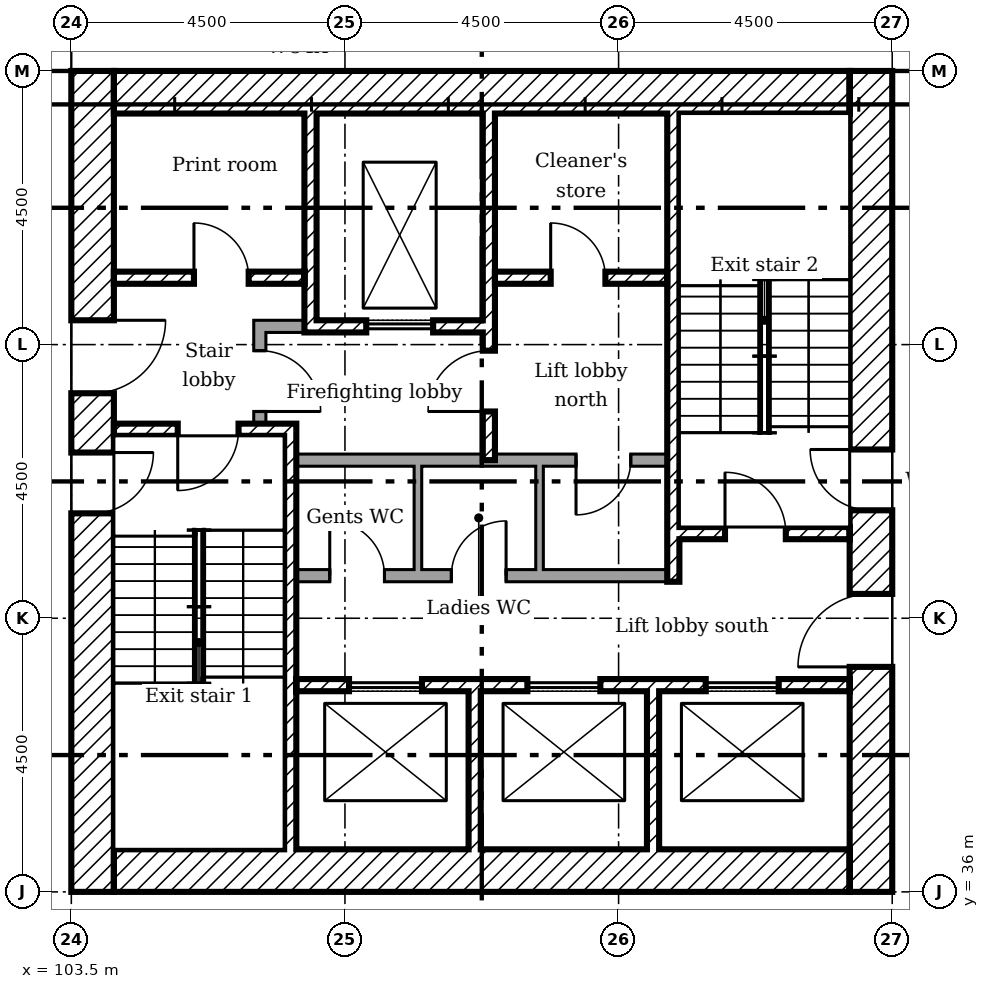
"""IFC4 building model, lengths in metres.
Left out: names, types, materials, properties, quantities, classifications, styles, units other than length and angle.
Written with IfcOpenShell. Run it as: python <this file> out.ifc"""

import sys

from ifc_helpers import new_model, si_unit, direction, frame, frame_2d, origin, place, context, subcontext, project, spatial, rectangle, extrude, element, fill, save


model = new_model("IFC4")
c1 = context("Model", 3, precision=1e-05, world=origin(), true_north=direction((0.0, 1.0)))
c2 = subcontext(c1, "Body", "Model", "MODEL_VIEW")
j1 = project(units=[si_unit("LENGTHUNIT", "METRE"), si_unit("PLANEANGLEUNIT", "RADIAN")], contexts=[c1])
p1 = place(None, origin())
s1 = spatial("IfcSite", under=j1, at=p1, CompositionType="ELEMENT")
p2 = place(p1, origin())
s2 = spatial("IfcBuilding", under=s1, at=p2, CompositionType="ELEMENT")
p3 = place(p2, frame((0.0, 0.0, 113.6)))
s3 = spatial("IfcBuildingStorey", under=s2, at=p3, CompositionType="ELEMENT", Elevation=113.6)
p4 = place(p3, frame((116.65, 36.0, 0.0), z_axis=(0.0, 0.0, 1.0), x_axis=(0.0, 1.0, 0.0)))
e1 = element("IfcWall", 1, at=p4, inside=s3, PredefinedType="SHEAR", context=c2, shape_type="SweptSolid", body=[
    extrude(rectangle(XDim=13.5, YDim=0.7, at=frame_2d((6.75, 0.0))), origin(), (0.0, 0.0, 1.0), 6.95),
])
p5 = place(p4, frame((3.7, 0.0, 0.0)))
e2 = element("IfcOpeningElement", 2, at=p5, cuts=e1, PredefinedType="OPENING", context=c2, shape_type="SweptSolid", body=[
    extrude(rectangle(XDim=1.2, YDim=2.1, at=frame_2d((0.6, 1.05))), frame((0.0, 0.36, 0.0), z_axis=(0.0, -1.0, 0.0), x_axis=(1.0, 0.0, 0.0)), (0.0, 0.0, 1.0), 0.72),
])
p6 = place(p4, frame((6.275, 0.0, 0.0)))
e3 = element("IfcOpeningElement", 3, at=p6, cuts=e1, PredefinedType="OPENING", context=c2, shape_type="SweptSolid", body=[
    extrude(rectangle(XDim=1.0, YDim=2.1, at=frame_2d((0.5, 1.05))), frame((0.0, 0.36, 0.0), z_axis=(0.0, -1.0, 0.0), x_axis=(1.0, 0.0, 0.0)), (0.0, 0.0, 1.0), 0.72),
])
for number, where in (
    (4, (104.2, 49.15, 0.0)),
    (5, (104.2, 36.35, 0.0)),
):
    element("IfcWall", number, at=place(p3, frame(where)), inside=s3, PredefinedType="SHEAR", context=c2, shape_type="SweptSolid", body=[
        extrude(rectangle(XDim=12.1, YDim=0.7, at=frame_2d((6.05, 0.0))), origin(), (0.0, 0.0, 1.0), 6.95),
    ])
p7 = place(p3, frame((103.85, 36.0, 0.0), z_axis=(0.0, 0.0, 1.0), x_axis=(0.0, 1.0, 0.0)))
e6 = element("IfcWall", 6, at=p7, inside=s3, PredefinedType="SHEAR", context=c2, shape_type="SweptSolid", body=[
    extrude(rectangle(XDim=13.5, YDim=0.7, at=frame_2d((6.75, 0.0))), origin(), (0.0, 0.0, 1.0), 6.95),
])
p8 = place(p7, frame((8.2, 0.0, 0.0)))
e7 = element("IfcOpeningElement", 7, at=p8, cuts=e6, PredefinedType="OPENING", context=c2, shape_type="SweptSolid", body=[
    extrude(rectangle(XDim=1.2, YDim=2.1, at=frame_2d((0.6, 1.05))), frame((0.0, 0.36, 0.0), z_axis=(0.0, -1.0, 0.0), x_axis=(1.0, 0.0, 0.0)), (0.0, 0.0, 1.0), 0.72),
])
p9 = place(p7, frame((6.225, 0.0, 0.0)))
e8 = element("IfcOpeningElement", 8, at=p9, cuts=e6, PredefinedType="OPENING", context=c2, shape_type="SweptSolid", body=[
    extrude(rectangle(XDim=1.0, YDim=2.1, at=frame_2d((0.5, 1.05))), frame((0.0, 0.36, 0.0), z_axis=(0.0, -1.0, 0.0), x_axis=(1.0, 0.0, 0.0)), (0.0, 0.0, 1.0), 0.72),
])
p10 = place(p3, frame((107.433, 48.8, 0.0), z_axis=(0.0, 0.0, 1.0), x_axis=(0.0, -1.0, 0.0)))
e9 = element("IfcWall", 9, at=p10, inside=s3, PredefinedType="SHEAR", context=c2, shape_type="SweptSolid", body=[
    extrude(rectangle(XDim=3.6, YDim=0.2, at=frame_2d((1.8, 0.0))), origin(), (0.0, 0.0, 1.0), 6.95),
])
p11 = place(p3, frame((110.367, 48.8, 0.0), z_axis=(0.0, 0.0, 1.0), x_axis=(0.0, -1.0, 0.0)))
e10 = element("IfcWall", 10, at=p11, inside=s3, PredefinedType="SHEAR", context=c2, shape_type="SweptSolid", body=[
    extrude(rectangle(XDim=5.7, YDim=0.2, at=frame_2d((2.85, 0.0))), origin(), (0.0, 0.0, 1.0), 6.95),
])
p12 = place(p11, frame((3.9, 0.0, 0.0)))
e11 = element("IfcOpeningElement", 11, at=p12, cuts=e10, PredefinedType="OPENING", context=c2, shape_type="SweptSolid", body=[
    extrude(rectangle(XDim=1.0, YDim=2.1, at=frame_2d((0.5, 1.05))), frame((0.0, 0.11, 0.0), z_axis=(0.0, -1.0, 0.0), x_axis=(1.0, 0.0, 0.0)), (0.0, 0.0, 1.0), 0.22),
])
for number, where, z_axis, x_axis in (
    (12, (110.133, 36.7, 0.0), (0.0, 0.0, 1.0), (0.0, 1.0, 0.0)),
    (13, (113.067, 36.7, 0.0), (0.0, 0.0, 1.0), (0.0, 1.0, 0.0)),
):
    element("IfcWall", number, at=place(p3, frame(where, z_axis=z_axis, x_axis=x_axis)), inside=s3, PredefinedType="SHEAR", context=c2, shape_type="SweptSolid", body=[
        extrude(rectangle(XDim=2.6, YDim=0.2, at=frame_2d((1.3, 0.0))), origin(), (0.0, 0.0, 1.0), 6.95),
    ])
p13 = place(p3, frame((106.5, 45.3, 0.0)))
e14 = element("IfcWall", 14, at=p13, inside=s3, PredefinedType="PARTITIONING", context=c2, shape_type="SweptSolid", body=[
    extrude(rectangle(XDim=0.833, YDim=0.2, at=frame_2d((0.417, 0.0))), origin(), (0.0, 0.0, 1.0), 6.95),
])
p14 = place(p3, frame((106.6, 43.7, 0.0), z_axis=(0.0, 0.0, 1.0), x_axis=(0.0, 1.0, 0.0)))
e15 = element("IfcWall", 15, at=p14, inside=s3, PredefinedType="PARTITIONING", context=c2, shape_type="SweptSolid", body=[
    extrude(rectangle(XDim=1.5, YDim=0.2, at=frame_2d((0.75, 0.0))), origin(), (0.0, 0.0, 1.0), 6.95),
])
p15 = place(p14, frame((0.2, 0.0, 0.0)))
e16 = element("IfcOpeningElement", 16, at=p15, cuts=e15, PredefinedType="OPENING", context=c2, shape_type="SweptSolid", body=[
    extrude(rectangle(XDim=1.0, YDim=2.1, at=frame_2d((0.5, 1.05))), frame((0.0, 0.11, 0.0), z_axis=(0.0, -1.0, 0.0), x_axis=(1.0, 0.0, 0.0)), (0.0, 0.0, 1.0), 0.22),
])
p16 = place(p3, frame((104.2, 46.1, 0.0)))
e17 = element("IfcWall", 17, at=p16, inside=s3, PredefinedType="SHEAR", context=c2, shape_type="SweptSolid", body=[
    extrude(rectangle(XDim=3.133, YDim=0.2, at=frame_2d((1.567, 0.0))), origin(), (0.0, 0.0, 1.0), 6.95),
])
p17 = place(p16, frame((1.317, 0.0, 0.0)))
e18 = element("IfcOpeningElement", 18, at=p17, cuts=e17, PredefinedType="OPENING", context=c2, shape_type="SweptSolid", body=[
    extrude(rectangle(XDim=0.9, YDim=2.1, at=frame_2d((0.45, 1.05))), frame((0.0, 0.11, 0.0), z_axis=(0.0, -1.0, 0.0), x_axis=(1.0, 0.0, 0.0)), (0.0, 0.0, 1.0), 0.22),
])
p18 = place(p3, frame((110.467, 46.1, 0.0)))
e19 = element("IfcWall", 19, at=p18, inside=s3, PredefinedType="SHEAR", context=c2, shape_type="SweptSolid", body=[
    extrude(rectangle(XDim=2.833, YDim=0.2, at=frame_2d((1.417, 0.0))), origin(), (0.0, 0.0, 1.0), 6.95),
])
p19 = place(p18, frame((0.917, 0.0, 0.0)))
e20 = element("IfcOpeningElement", 20, at=p19, cuts=e19, PredefinedType="OPENING", context=c2, shape_type="SweptSolid", body=[
    extrude(rectangle(XDim=0.9, YDim=2.1, at=frame_2d((0.45, 1.05))), frame((0.0, 0.11, 0.0), z_axis=(0.0, -1.0, 0.0), x_axis=(1.0, 0.0, 0.0)), (0.0, 0.0, 1.0), 0.22),
])
p20 = place(p3, frame((107.533, 45.3, 0.0)))
e21 = element("IfcWall", 21, at=p20, inside=s3, PredefinedType="SHEAR", context=c2, shape_type="SweptSolid", body=[
    extrude(rectangle(XDim=2.733, YDim=0.2, at=frame_2d((1.367, 0.0))), origin(), (0.0, 0.0, 1.0), 6.95),
])
p21 = place(p20, frame((0.817, 0.0, 0.0)))
e22 = element("IfcOpeningElement", 22, at=p21, cuts=e21, PredefinedType="OPENING", context=c2, shape_type="SweptSolid", body=[
    extrude(rectangle(XDim=1.1, YDim=2.1, at=frame_2d((0.55, 1.05))), frame((0.0, 0.11, 0.0), z_axis=(0.0, -1.0, 0.0), x_axis=(1.0, 0.0, 0.0)), (0.0, 0.0, 1.0), 0.22),
])
p22 = place(p3, frame((107.2, 39.4, 0.0)))
e23 = element("IfcWall", 23, at=p22, inside=s3, PredefinedType="SHEAR", context=c2, shape_type="SweptSolid", body=[
    extrude(rectangle(XDim=9.1, YDim=0.2, at=frame_2d((4.55, 0.0))), origin(), (0.0, 0.0, 1.0), 6.95),
])
p23 = place(p22, frame((0.867, 0.0, 0.0)))
e24 = element("IfcOpeningElement", 24, at=p23, cuts=e23, PredefinedType="OPENING", context=c2, shape_type="SweptSolid", body=[
    extrude(rectangle(XDim=1.2, YDim=2.1, at=frame_2d((0.6, 1.05))), frame((0.0, 0.11, 0.0), z_axis=(0.0, -1.0, 0.0), x_axis=(1.0, 0.0, 0.0)), (0.0, 0.0, 1.0), 0.22),
])
p24 = place(p22, frame((3.8, 0.0, 0.0)))
e25 = element("IfcOpeningElement", 25, at=p24, cuts=e23, PredefinedType="OPENING", context=c2, shape_type="SweptSolid", body=[
    extrude(rectangle(XDim=1.2, YDim=2.1, at=frame_2d((0.6, 1.05))), frame((0.0, 0.11, 0.0), z_axis=(0.0, -1.0, 0.0), x_axis=(1.0, 0.0, 0.0)), (0.0, 0.0, 1.0), 0.22),
])
p25 = place(p22, frame((6.733, 0.0, 0.0)))
e26 = element("IfcOpeningElement", 26, at=p25, cuts=e23, PredefinedType="OPENING", context=c2, shape_type="SweptSolid", body=[
    extrude(rectangle(XDim=1.2, YDim=2.1, at=frame_2d((0.6, 1.05))), frame((0.0, 0.11, 0.0), z_axis=(0.0, -1.0, 0.0), x_axis=(1.0, 0.0, 0.0)), (0.0, 0.0, 1.0), 0.22),
])
p26 = place(p3, frame((107.1, 36.7, 0.0), z_axis=(0.0, 0.0, 1.0), x_axis=(0.0, 1.0, 0.0)))
e27 = element("IfcWall", 27, at=p26, inside=s3, PredefinedType="SHEAR", context=c2, shape_type="SweptSolid", body=[
    extrude(rectangle(XDim=7.0, YDim=0.2, at=frame_2d((3.5, 0.0))), origin(), (0.0, 0.0, 1.0), 6.95),
])
p27 = place(p3, frame((104.2, 43.6, 0.0)))
e28 = element("IfcWall", 28, at=p27, inside=s3, PredefinedType="SHEAR", context=c2, shape_type="SweptSolid", body=[
    extrude(rectangle(XDim=2.8, YDim=0.2, at=frame_2d((1.4, 0.0))), origin(), (0.0, 0.0, 1.0), 6.95),
])
p28 = place(p27, frame((1.05, 0.0, 0.0)))
e29 = element("IfcOpeningElement", 29, at=p28, cuts=e28, PredefinedType="OPENING", context=c2, shape_type="SweptSolid", body=[
    extrude(rectangle(XDim=1.0, YDim=2.1, at=frame_2d((0.5, 1.05))), frame((0.0, 0.11, 0.0), z_axis=(0.0, -1.0, 0.0), x_axis=(1.0, 0.0, 0.0)), (0.0, 0.0, 1.0), 0.22),
])
p29 = place(p3, frame((113.5, 41.9, 0.0)))
e30 = element("IfcWall", 30, at=p29, inside=s3, PredefinedType="SHEAR", context=c2, shape_type="SweptSolid", body=[
    extrude(rectangle(XDim=2.8, YDim=0.2, at=frame_2d((1.4, 0.0))), origin(), (0.0, 0.0, 1.0), 6.95),
])
p30 = place(p29, frame((0.75, 0.0, 0.0)))
e31 = element("IfcOpeningElement", 31, at=p30, cuts=e30, PredefinedType="OPENING", context=c2, shape_type="SweptSolid", body=[
    extrude(rectangle(XDim=1.0, YDim=2.1, at=frame_2d((0.5, 1.05))), frame((0.0, 0.11, 0.0), z_axis=(0.0, -1.0, 0.0), x_axis=(1.0, 0.0, 0.0)), (0.0, 0.0, 1.0), 0.22),
])
p31 = place(p3, frame((113.4, 41.1, 0.0), z_axis=(0.0, 0.0, 1.0), x_axis=(0.0, 1.0, 0.0)))
e32 = element("IfcWall", 32, at=p31, inside=s3, PredefinedType="SHEAR", context=c2, shape_type="SweptSolid", body=[
    extrude(rectangle(XDim=7.7, YDim=0.2, at=frame_2d((3.85, 0.0))), origin(), (0.0, 0.0, 1.0), 6.95),
])
p32 = place(p3, frame((107.2, 43.1, 0.0)))
e33 = element("IfcWall", 33, at=p32, inside=s3, PredefinedType="PARTITIONING", context=c2, shape_type="SweptSolid", body=[
    extrude(rectangle(XDim=6.1, YDim=0.2, at=frame_2d((3.05, 0.0))), origin(), (0.0, 0.0, 1.0), 6.95),
])
p33 = place(p32, frame((4.6, 0.0, 0.0)))
e34 = element("IfcOpeningElement", 34, at=p33, cuts=e33, PredefinedType="OPENING", context=c2, shape_type="SweptSolid", body=[
    extrude(rectangle(XDim=0.9, YDim=2.1, at=frame_2d((0.45, 1.05))), frame((0.0, 0.11, 0.0), z_axis=(0.0, -1.0, 0.0), x_axis=(1.0, 0.0, 0.0)), (0.0, 0.0, 1.0), 0.22),
])
p34 = place(p3, frame((107.2, 41.2, 0.0)))
e35 = element("IfcWall", 35, at=p34, inside=s3, PredefinedType="PARTITIONING", context=c2, shape_type="SweptSolid", body=[
    extrude(rectangle(XDim=6.1, YDim=0.2, at=frame_2d((3.05, 0.0))), origin(), (0.0, 0.0, 1.0), 6.95),
])
p35 = place(p34, frame((0.55, 0.0, 0.0)))
e36 = element("IfcOpeningElement", 36, at=p35, cuts=e35, PredefinedType="OPENING", context=c2, shape_type="SweptSolid", body=[
    extrude(rectangle(XDim=0.9, YDim=2.1, at=frame_2d((0.45, 1.05))), frame((0.0, 0.11, 0.0), z_axis=(0.0, -1.0, 0.0), x_axis=(1.0, 0.0, 0.0)), (0.0, 0.0, 1.0), 0.22),
])
p36 = place(p34, frame((2.55, 0.0, 0.0)))
e37 = element("IfcOpeningElement", 37, at=p36, cuts=e35, PredefinedType="OPENING", context=c2, shape_type="SweptSolid", body=[
    extrude(rectangle(XDim=0.9, YDim=2.1, at=frame_2d((0.45, 1.05))), frame((0.0, 0.11, 0.0), z_axis=(0.0, -1.0, 0.0), x_axis=(1.0, 0.0, 0.0)), (0.0, 0.0, 1.0), 0.22),
])
for number, where, z_axis, x_axis in (
    (38, (109.2, 41.3, 0.0), (0.0, 0.0, 1.0), (0.0, 1.0, 0.0)),
    (39, (111.2, 41.3, 0.0), (0.0, 0.0, 1.0), (0.0, 1.0, 0.0)),
):
    element("IfcWall", number, at=place(p3, frame(where, z_axis=z_axis, x_axis=x_axis)), inside=s3, PredefinedType="PARTITIONING", context=c2, shape_type="SweptSolid", body=[
        extrude(rectangle(XDim=1.7, YDim=0.125, at=frame_2d((0.85, 0.0))), origin(), (0.0, 0.0, 1.0), 6.95),
    ])
p37 = place(p8, frame((1.2, 0.0, 0.0), x_axis=(-1.0, 0.0, 0.0)))
e40 = element("IfcDoor", 40, at=p37, inside=s3, OperationType="SINGLE_SWING_RIGHT", PredefinedType="DOOR", context=c2, shape_type="SweptSolid", body=[
    extrude(rectangle(XDim=1.2, YDim=2.1, at=frame_2d((0.6, 1.05))), frame((0.0, 0.025, 0.0), z_axis=(0.0, -1.0, 0.0), x_axis=(1.0, 0.0, 0.0)), (0.0, 0.0, 1.0), 0.05),
])
fill(e7, e40)
p38 = place(p5, origin())
e41 = element("IfcDoor", 41, at=p38, inside=s3, OperationType="SINGLE_SWING_RIGHT", PredefinedType="DOOR", context=c2, shape_type="SweptSolid", body=[
    extrude(rectangle(XDim=1.2, YDim=2.1, at=frame_2d((0.6, 1.05))), frame((0.0, 0.025, 0.0), z_axis=(0.0, -1.0, 0.0), x_axis=(1.0, 0.0, 0.0)), (0.0, 0.0, 1.0), 0.05),
])
fill(e2, e41)
p39 = place(p28, frame((1.0, 0.0, 0.0), x_axis=(-1.0, 0.0, 0.0)))
e42 = element("IfcDoor", 42, at=p39, inside=s3, OperationType="SINGLE_SWING_LEFT", PredefinedType="DOOR", context=c2, shape_type="SweptSolid", body=[
    extrude(rectangle(XDim=1.0, YDim=2.1, at=frame_2d((0.5, 1.05))), frame((0.0, 0.025, 0.0), z_axis=(0.0, -1.0, 0.0), x_axis=(1.0, 0.0, 0.0)), (0.0, 0.0, 1.0), 0.05),
])
fill(e29, e42)
p40 = place(p9, frame((1.0, 0.0, 0.0), x_axis=(-1.0, 0.0, 0.0)))
e43 = element("IfcDoor", 43, at=p40, inside=s3, OperationType="SINGLE_SWING_RIGHT", PredefinedType="DOOR", context=c2, shape_type="SweptSolid", body=[
    extrude(rectangle(XDim=1.0, YDim=2.1, at=frame_2d((0.5, 1.05))), frame((0.0, 0.025, 0.0), z_axis=(0.0, -1.0, 0.0), x_axis=(1.0, 0.0, 0.0)), (0.0, 0.0, 1.0), 0.05),
])
fill(e8, e43)
p41 = place(p30, origin())
e44 = element("IfcDoor", 44, at=p41, inside=s3, OperationType="SINGLE_SWING_RIGHT", PredefinedType="DOOR", context=c2, shape_type="SweptSolid", body=[
    extrude(rectangle(XDim=1.0, YDim=2.1, at=frame_2d((0.5, 1.05))), frame((0.0, 0.025, 0.0), z_axis=(0.0, -1.0, 0.0), x_axis=(1.0, 0.0, 0.0)), (0.0, 0.0, 1.0), 0.05),
])
fill(e31, e44)
p42 = place(p6, origin())
e45 = element("IfcDoor", 45, at=p42, inside=s3, OperationType="SINGLE_SWING_LEFT", PredefinedType="DOOR", context=c2, shape_type="SweptSolid", body=[
    extrude(rectangle(XDim=1.0, YDim=2.1, at=frame_2d((0.5, 1.05))), frame((0.0, 0.025, 0.0), z_axis=(0.0, -1.0, 0.0), x_axis=(1.0, 0.0, 0.0)), (0.0, 0.0, 1.0), 0.05),
])
fill(e3, e45)
p43 = place(p12, frame((1.0, 0.0, 0.0), x_axis=(-1.0, 0.0, 0.0)))
e46 = element("IfcDoor", 46, at=p43, inside=s3, OperationType="SINGLE_SWING_RIGHT", PredefinedType="DOOR", context=c2, shape_type="SweptSolid", body=[
    extrude(rectangle(XDim=1.0, YDim=2.1, at=frame_2d((0.5, 1.05))), frame((0.0, 0.025, 0.0), z_axis=(0.0, -1.0, 0.0), x_axis=(1.0, 0.0, 0.0)), (0.0, 0.0, 1.0), 0.05),
])
fill(e11, e46)
p44 = place(p15, frame((1.0, 0.0, 0.0), x_axis=(-1.0, 0.0, 0.0)))
e47 = element("IfcDoor", 47, at=p44, inside=s3, OperationType="SINGLE_SWING_LEFT", PredefinedType="DOOR", context=c2, shape_type="SweptSolid", body=[
    extrude(rectangle(XDim=1.0, YDim=2.1, at=frame_2d((0.5, 1.05))), frame((0.0, 0.025, 0.0), z_axis=(0.0, -1.0, 0.0), x_axis=(1.0, 0.0, 0.0)), (0.0, 0.0, 1.0), 0.05),
])
fill(e16, e47)
p45 = place(p17, origin())
e48 = element("IfcDoor", 48, at=p45, inside=s3, OperationType="SINGLE_SWING_RIGHT", PredefinedType="DOOR", context=c2, shape_type="SweptSolid", body=[
    extrude(rectangle(XDim=0.9, YDim=2.1, at=frame_2d((0.45, 1.05))), frame((0.0, 0.025, 0.0), z_axis=(0.0, -1.0, 0.0), x_axis=(1.0, 0.0, 0.0)), (0.0, 0.0, 1.0), 0.05),
])
fill(e18, e48)
p46 = place(p19, origin())
e49 = element("IfcDoor", 49, at=p46, inside=s3, OperationType="SINGLE_SWING_RIGHT", PredefinedType="DOOR", context=c2, shape_type="SweptSolid", body=[
    extrude(rectangle(XDim=0.9, YDim=2.1, at=frame_2d((0.45, 1.05))), frame((0.0, 0.025, 0.0), z_axis=(0.0, -1.0, 0.0), x_axis=(1.0, 0.0, 0.0)), (0.0, 0.0, 1.0), 0.05),
])
fill(e20, e49)
p47 = place(p35, origin())
e50 = element("IfcDoor", 50, at=p47, inside=s3, OperationType="SINGLE_SWING_RIGHT", PredefinedType="DOOR", context=c2, shape_type="SweptSolid", body=[
    extrude(rectangle(XDim=0.9, YDim=2.1, at=frame_2d((0.45, 1.05))), frame((0.0, 0.025, 0.0), z_axis=(0.0, -1.0, 0.0), x_axis=(1.0, 0.0, 0.0)), (0.0, 0.0, 1.0), 0.05),
])
fill(e36, e50)
p48 = place(p36, origin())
e51 = element("IfcDoor", 51, at=p48, inside=s3, OperationType="SINGLE_SWING_LEFT", PredefinedType="DOOR", context=c2, shape_type="SweptSolid", body=[
    extrude(rectangle(XDim=0.9, YDim=2.1, at=frame_2d((0.45, 1.05))), frame((0.0, 0.025, 0.0), z_axis=(0.0, -1.0, 0.0), x_axis=(1.0, 0.0, 0.0)), (0.0, 0.0, 1.0), 0.05),
])
fill(e37, e51)
p49 = place(p33, frame((0.9, 0.0, 0.0), x_axis=(-1.0, 0.0, 0.0)))
e52 = element("IfcDoor", 52, at=p49, inside=s3, OperationType="SINGLE_SWING_LEFT", PredefinedType="DOOR", context=c2, shape_type="SweptSolid", body=[
    extrude(rectangle(XDim=0.9, YDim=2.1, at=frame_2d((0.45, 1.05))), frame((0.0, 0.025, 0.0), z_axis=(0.0, -1.0, 0.0), x_axis=(1.0, 0.0, 0.0)), (0.0, 0.0, 1.0), 0.05),
])
fill(e34, e52)
p50 = place(p21, origin())
e53 = element("IfcDoor", 53, at=p50, inside=s3, OperationType="SLIDING_TO_LEFT", PredefinedType="DOOR", context=c2, shape_type="SweptSolid", body=[
    extrude(rectangle(XDim=1.1, YDim=2.1, at=frame_2d((0.55, 1.05))), frame((0.0, 0.025, 0.0), z_axis=(0.0, -1.0, 0.0), x_axis=(1.0, 0.0, 0.0)), (0.0, 0.0, 1.0), 0.05),
])
fill(e22, e53)
p51 = place(p23, origin())
e54 = element("IfcDoor", 54, at=p51, inside=s3, OperationType="SLIDING_TO_LEFT", PredefinedType="DOOR", context=c2, shape_type="SweptSolid", body=[
    extrude(rectangle(XDim=1.2, YDim=2.1, at=frame_2d((0.6, 1.05))), frame((0.0, 0.025, 0.0), z_axis=(0.0, -1.0, 0.0), x_axis=(1.0, 0.0, 0.0)), (0.0, 0.0, 1.0), 0.05),
])
fill(e24, e54)
p52 = place(p24, origin())
e55 = element("IfcDoor", 55, at=p52, inside=s3, OperationType="SLIDING_TO_LEFT", PredefinedType="DOOR", context=c2, shape_type="SweptSolid", body=[
    extrude(rectangle(XDim=1.2, YDim=2.1, at=frame_2d((0.6, 1.05))), frame((0.0, 0.025, 0.0), z_axis=(0.0, -1.0, 0.0), x_axis=(1.0, 0.0, 0.0)), (0.0, 0.0, 1.0), 0.05),
])
fill(e25, e55)
p53 = place(p25, origin())
e56 = element("IfcDoor", 56, at=p53, inside=s3, OperationType="SLIDING_TO_LEFT", PredefinedType="DOOR", context=c2, shape_type="SweptSolid", body=[
    extrude(rectangle(XDim=1.2, YDim=2.1, at=frame_2d((0.6, 1.05))), frame((0.0, 0.025, 0.0), z_axis=(0.0, -1.0, 0.0), x_axis=(1.0, 0.0, 0.0)), (0.0, 0.0, 1.0), 0.05),
])
fill(e26, e56)
save(model, sys.argv[1])
